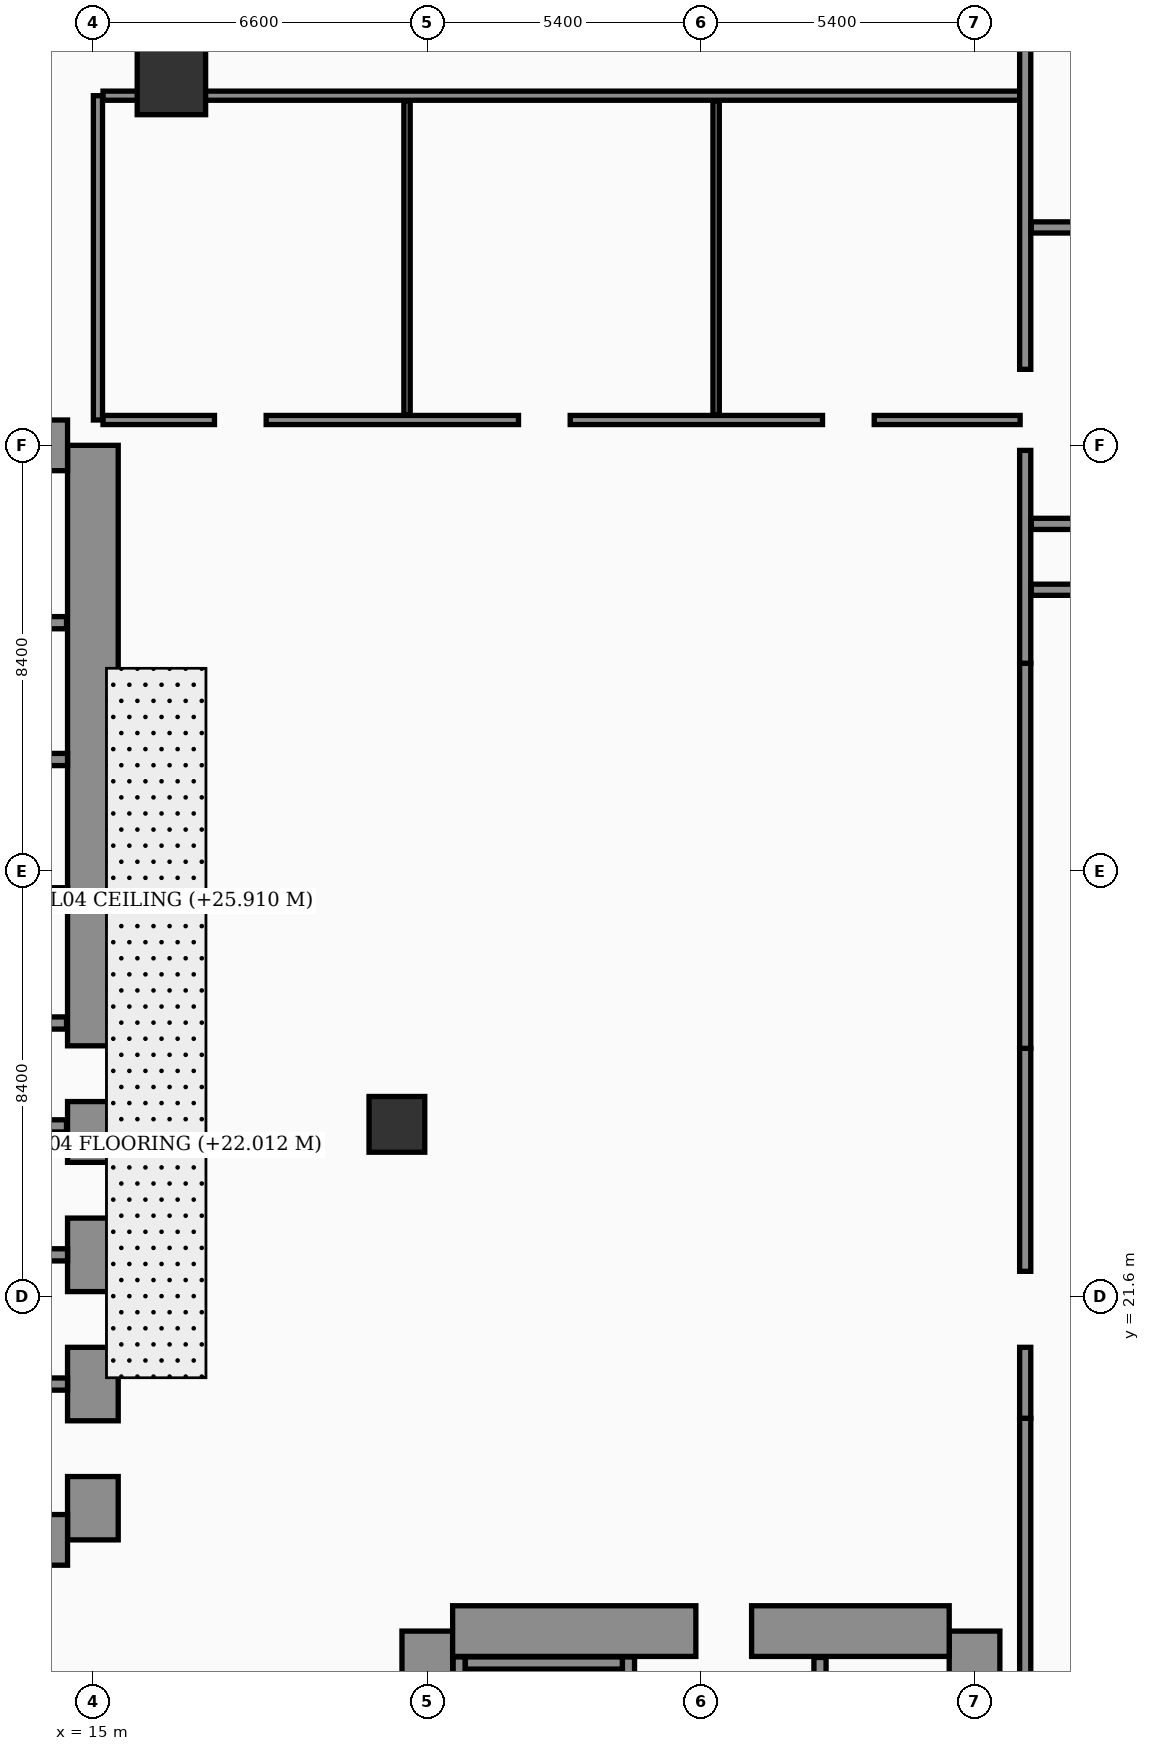
"""IFC4 building model, lengths in metres.
Left out: names, types, materials, properties, quantities, classifications, styles, units other than length and angle.
Written with IfcOpenShell. Run it as: python <this file> out.ifc"""

import sys

from ifc_helpers import new_model, si_unit, direction, frame, frame_2d, origin, origin_2d, place, context, subcontext, project, spatial, rectangle, hollow_rectangle, extrude, element, fill, save


model = new_model("IFC4")
c1 = context("Model", 3, precision=1e-05, world=origin(), true_north=direction((0.0, 1.0)))
c2 = subcontext(c1, "Body", "Model", "MODEL_VIEW")
j1 = project(units=[si_unit("LENGTHUNIT", "METRE"), si_unit("PLANEANGLEUNIT", "RADIAN")], contexts=[c1])
p1 = place(None, origin())
s1 = spatial("IfcSite", under=j1, at=p1, CompositionType="ELEMENT")
p2 = place(p1, origin())
s2 = spatial("IfcBuilding", under=s1, at=p2, CompositionType="ELEMENT")
p3 = place(p2, frame((0.0, 0.0, 22.0)))
s3 = spatial("IfcBuildingStorey", under=s2, at=p3, CompositionType="ELEMENT", Elevation=22.0)
p4 = place(p3, frame((15.0, 16.8, 0.0), z_axis=(0.0, 0.0, 1.0), x_axis=(0.0, 1.0, 0.0)))
e1 = element("IfcWall", 1, at=p4, inside=s3, PredefinedType="SHEAR", context=c2, shape_type="SweptSolid", body=[
    extrude(rectangle(XDim=21.6, YDim=1.0, at=frame_2d((10.8, 0.0))), origin(), (0.0, 0.0, 1.0), 4.76),
])
p5 = place(p4, frame((8.65, 0.0, 0.0)))
e2 = element("IfcOpeningElement", 2, at=p5, cuts=e1, PredefinedType="OPENING", context=c2, shape_type="SweptSolid", body=[
    extrude(rectangle(XDim=1.1, YDim=2.2, at=frame_2d((0.55, 1.1))), frame((0.0, 0.51, 0.0), z_axis=(0.0, -1.0, 0.0), x_axis=(1.0, 0.0, 0.0)), (0.0, 0.0, 1.0), 1.02),
])
p6 = place(p4, frame((1.25, 0.0, 0.0)))
e3 = element("IfcOpeningElement", 3, at=p6, cuts=e1, PredefinedType="OPENING", context=c2, shape_type="SweptSolid", body=[
    extrude(rectangle(XDim=1.1, YDim=2.2, at=frame_2d((0.55, 1.1))), frame((0.0, 0.51, 0.0), z_axis=(0.0, -1.0, 0.0), x_axis=(1.0, 0.0, 0.0)), (0.0, 0.0, 1.0), 1.02),
])
p7 = place(p4, frame((3.8, 0.0, 0.0)))
e4 = element("IfcOpeningElement", 4, at=p7, cuts=e1, PredefinedType="OPENING", context=c2, shape_type="SweptSolid", body=[
    extrude(rectangle(XDim=1.1, YDim=2.2, at=frame_2d((0.55, 1.1))), frame((0.0, 0.51, 0.0), z_axis=(0.0, -1.0, 0.0), x_axis=(1.0, 0.0, 0.0)), (0.0, 0.0, 1.0), 1.02),
])
p8 = place(p4, frame((6.35, 0.0, 0.0)))
e5 = element("IfcOpeningElement", 5, at=p8, cuts=e1, PredefinedType="OPENING", context=c2, shape_type="SweptSolid", body=[
    extrude(rectangle(XDim=1.1, YDim=2.2, at=frame_2d((0.55, 1.1))), frame((0.0, 0.51, 0.0), z_axis=(0.0, -1.0, 0.0), x_axis=(1.0, 0.0, 0.0)), (0.0, 0.0, 1.0), 1.02),
])
for number, where, z_axis, x_axis in (
    (6, (4.7, 38.4, 0.0), (0.0, 0.0, 1.0), (1.0, 0.0, 0.0)),
    (7, (4.7, 16.8, 0.0), (0.0, 0.0, 1.0), (1.0, 0.0, 0.0)),
):
    element("IfcWall", number, at=place(p3, frame(where, z_axis=z_axis, x_axis=x_axis)), inside=s3, PredefinedType="SHEAR", context=c2, shape_type="SweptSolid", body=[
        extrude(rectangle(XDim=9.8, YDim=1.0, at=frame_2d((4.9, 0.0))), origin(), (0.0, 0.0, 1.0), 4.76),
    ])
for number, where, z_axis, x_axis in (
    (8, (21.6, 4.6, 0.0), (0.0, 0.0, 1.0), (0.0, 1.0, 0.0)),
    (9, (32.4, 4.6, 0.0), (0.0, 0.0, 1.0), (0.0, 1.0, 0.0)),
):
    element("IfcWall", number, at=place(p3, frame(where, z_axis=z_axis, x_axis=x_axis)), inside=s3, PredefinedType="SHEAR", context=c2, shape_type="SweptSolid", body=[
        extrude(rectangle(XDim=10.4, YDim=1.0, at=frame_2d((5.2, 0.0))), origin(), (0.0, 0.0, 1.0), 4.76),
    ])
p9 = place(p3, frame((22.1, 15.0, 0.0), z_axis=(0.0, 0.0, 1.0), x_axis=(1.0, 0.0, 0.0)))
e10 = element("IfcWall", 10, at=p9, inside=s3, PredefinedType="SHEAR", context=c2, shape_type="SweptSolid", body=[
    extrude(rectangle(XDim=9.8, YDim=1.0, at=frame_2d((4.9, 0.0))), origin(), (0.0, 0.0, 1.0), 4.76),
])
p10 = place(p9, frame((4.8, 0.0, 0.0)))
e11 = element("IfcOpeningElement", 11, at=p10, cuts=e10, PredefinedType="OPENING", context=c2, shape_type="SweptSolid", body=[
    extrude(rectangle(XDim=1.1, YDim=2.2, at=frame_2d((0.55, 1.1))), frame((0.0, 0.51, 0.0), z_axis=(0.0, -1.0, 0.0), x_axis=(1.0, 0.0, 0.0)), (0.0, 0.0, 1.0), 1.02),
])
p11 = place(p3, frame((22.23, 5.1, 0.0), z_axis=(0.0, 0.0, 1.0), x_axis=(0.0, 1.0, 0.0)))
e12 = element("IfcWall", 12, at=p11, inside=s3, PredefinedType="SOLIDWALL", context=c2, shape_type="SweptSolid", body=[
    extrude(rectangle(XDim=9.39, YDim=0.24, at=frame_2d((4.695, 0.0))), origin(), (0.0, 0.0, 1.0), 4.76),
])
p12 = place(p3, frame((25.57, 5.1, 0.0), z_axis=(0.0, 0.0, 1.0), x_axis=(0.0, 1.0, 0.0)))
e13 = element("IfcWall", 13, at=p12, inside=s3, PredefinedType="SOLIDWALL", context=c2, shape_type="SweptSolid", body=[
    extrude(rectangle(XDim=9.39, YDim=0.24, at=frame_2d((4.695, 0.0))), origin(), (0.0, 0.0, 1.0), 4.76),
])
p13 = place(p12, frame((0.35, 0.0, 0.0)))
e14 = element("IfcOpeningElement", 14, at=p13, cuts=e13, PredefinedType="OPENING", context=c2, shape_type="SweptSolid", body=[
    extrude(rectangle(XDim=1.15, YDim=2.2, at=frame_2d((0.575, 1.1))), frame((0.0, 0.13, 0.0), z_axis=(0.0, -1.0, 0.0), x_axis=(1.0, 0.0, 0.0)), (0.0, 0.0, 1.0), 0.26),
])
p14 = place(p3, frame((22.35, 14.37, 0.0), z_axis=(0.0, 0.0, 1.0), x_axis=(1.0, 0.0, 0.0)))
e15 = element("IfcWall", 15, at=p14, inside=s3, PredefinedType="SOLIDWALL", context=c2, shape_type="SweptSolid", body=[
    extrude(rectangle(XDim=3.1, YDim=0.24, at=frame_2d((1.55, 0.0))), origin(), (0.0, 0.0, 1.0), 4.76),
])
for number, where, z_axis, x_axis in (
    (16, (12.18, 19.875, 0.0), (0.0, 0.0, 1.0), (1.0, 0.0, 0.0)),
    (17, (12.18, 22.425, 0.0), (0.0, 0.0, 1.0), (1.0, 0.0, 0.0)),
    (18, (12.18, 29.55, 0.0), (0.0, 0.0, 1.0), (1.0, 0.0, 0.0)),
    (19, (12.18, 32.2, 0.0), (0.0, 0.0, 1.0), (1.0, 0.0, 0.0)),
):
    element("IfcWall", number, at=place(p3, frame(where, z_axis=z_axis, x_axis=x_axis)), inside=s3, PredefinedType="SOLIDWALL", context=c2, shape_type="SweptSolid", body=[
        extrude(rectangle(XDim=2.32, YDim=0.24, at=frame_2d((1.16, 0.0))), origin(), (0.0, 0.0, 1.0), 4.76),
    ])
p15 = place(p3, frame((16.55, 45.6, 0.0), z_axis=(0.0, 0.0, 1.0), x_axis=(1.0, 0.0, 0.0)))
e20 = element("IfcColumn", 20, at=p15, inside=s3, PredefinedType="COLUMN", context=c2, shape_type="SweptSolid", body=[
    extrude(rectangle(XDim=1.35, YDim=1.35, at=origin_2d()), origin(), (0.0, 0.0, 1.0), 4.76),
])
p16 = place(p3, frame((21.0, 25.0, 0.0), z_axis=(0.0, 0.0, 1.0), x_axis=(1.0, 0.0, 0.0)))
e21 = element("IfcColumn", 21, at=p16, inside=s3, PredefinedType="COLUMN", context=c2, shape_type="SweptSolid", body=[
    extrude(hollow_rectangle(XDim=1.1, YDim=1.1, WallThickness=0.045, at=origin_2d()), origin(), (0.0, 0.0, 1.0), 4.76),
])
p17 = place(p3, frame((12.15, 24.97, 0.0), z_axis=(0.0, 0.0, 1.0), x_axis=(1.0, 0.0, 0.0)))
e22 = element("IfcWall", 22, at=p17, inside=s3, PredefinedType="SOLIDWALL", context=c2, shape_type="SweptSolid", body=[
    extrude(rectangle(XDim=2.33, YDim=0.24, at=frame_2d((1.165, 0.0))), origin(), (0.0, 0.0, 1.0), 3.94),
])
p18 = place(p3, frame((12.25, 27.0, 0.0), z_axis=(0.0, 0.0, 1.0), x_axis=(1.0, 0.0, 0.0)))
e23 = element("IfcWall", 23, at=p18, inside=s3, PredefinedType="SOLIDWALL", context=c2, shape_type="SweptSolid", body=[
    extrude(rectangle(XDim=2.23, YDim=0.24, at=frame_2d((1.115, 0.0))), origin(), (0.0, 0.0, 1.0), 4.76),
])
p19 = place(p3, frame((9.66, 34.9, 0.0), z_axis=(0.0, 0.0, 1.0), x_axis=(1.0, 0.0, 0.0)))
e24 = element("IfcWall", 24, at=p19, inside=s3, PredefinedType="SOLIDWALL", context=c2, shape_type="SweptSolid", body=[
    extrude(rectangle(XDim=4.82, YDim=0.24, at=frame_2d((2.41, 0.0))), origin(), (0.0, 0.0, 1.0), 4.76),
])
p20 = place(p3, frame((29.35, 5.12, 0.0), z_axis=(0.0, 0.0, 1.0), x_axis=(0.0, 1.0, 0.0)))
e25 = element("IfcWall", 25, at=p20, inside=s3, PredefinedType="SOLIDWALL", context=c2, shape_type="SweptSolid", body=[
    extrude(rectangle(XDim=9.36, YDim=0.24, at=frame_2d((4.68, 0.0))), origin(), (0.0, 0.0, 1.0), 4.76),
])
p21 = place(p20, frame((0.55, 0.0, 0.0)))
e26 = element("IfcOpeningElement", 26, at=p21, cuts=e25, PredefinedType="OPENING", context=c2, shape_type="SweptSolid", body=[
    extrude(rectangle(XDim=1.3, YDim=2.35, at=frame_2d((0.65, 1.175))), frame((0.0, 0.13, 0.0), z_axis=(0.0, -1.0, 0.0), x_axis=(1.0, 0.0, 0.0)), (0.0, 0.0, 1.0), 0.26),
])
p22 = place(p3, frame((15.2, 38.9, 0.0), z_axis=(0.0, 0.0, 1.0), x_axis=(1.0, 0.0, 0.0)))
e27 = element("IfcWall", 27, at=p22, inside=s3, PredefinedType="PARTITIONING", context=c2, shape_type="SweptSolid", body=[
    extrude(rectangle(XDim=18.1, YDim=0.18, at=frame_2d((9.05, 0.0))), origin(), (0.0, 0.0, 1.0), 3.94),
])
p23 = place(p22, frame((2.2, 0.0, 0.0)))
e28 = element("IfcOpeningElement", 28, at=p23, cuts=e27, PredefinedType="OPENING", context=c2, shape_type="SweptSolid", body=[
    extrude(rectangle(XDim=1.02, YDim=2.2, at=frame_2d((0.51, 1.1))), frame((0.0, 0.1, 0.0), z_axis=(0.0, -1.0, 0.0), x_axis=(1.0, 0.0, 0.0)), (0.0, 0.0, 1.0), 0.2),
])
p24 = place(p22, frame((8.2, 0.0, 0.0)))
e29 = element("IfcOpeningElement", 29, at=p24, cuts=e27, PredefinedType="OPENING", context=c2, shape_type="SweptSolid", body=[
    extrude(rectangle(XDim=1.02, YDim=2.2, at=frame_2d((0.51, 1.1))), frame((0.0, 0.1, 0.0), z_axis=(0.0, -1.0, 0.0), x_axis=(1.0, 0.0, 0.0)), (0.0, 0.0, 1.0), 0.2),
])
p25 = place(p22, frame((14.2, 0.0, 0.0)))
e30 = element("IfcOpeningElement", 30, at=p25, cuts=e27, PredefinedType="OPENING", context=c2, shape_type="SweptSolid", body=[
    extrude(rectangle(XDim=1.02, YDim=2.2, at=frame_2d((0.51, 1.1))), frame((0.0, 0.1, 0.0), z_axis=(0.0, -1.0, 0.0), x_axis=(1.0, 0.0, 0.0)), (0.0, 0.0, 1.0), 0.2),
])
p26 = place(p3, frame((15.2, 45.3, 0.0), z_axis=(0.0, 0.0, 1.0), x_axis=(1.0, 0.0, 0.0)))
e31 = element("IfcWall", 31, at=p26, inside=s3, PredefinedType="PARTITIONING", context=c2, shape_type="SweptSolid", body=[
    extrude(rectangle(XDim=18.1, YDim=0.18, at=frame_2d((9.05, 0.0))), origin(), (0.0, 0.0, 1.0), 3.94),
])
p27 = place(p3, frame((15.1, 38.9, 0.0), z_axis=(0.0, 0.0, 1.0), x_axis=(0.0, 1.0, 0.0)))
e32 = element("IfcWall", 32, at=p27, inside=s3, PredefinedType="PARTITIONING", context=c2, shape_type="SweptSolid", body=[
    extrude(rectangle(XDim=6.4, YDim=0.18, at=frame_2d((3.2, 0.0))), origin(), (0.0, 0.0, 1.0), 3.94),
])
p28 = place(p3, frame((21.2, 39.0, 0.0), z_axis=(0.0, 0.0, 1.0), x_axis=(0.0, 1.0, 0.0)))
e33 = element("IfcWall", 33, at=p28, inside=s3, PredefinedType="PARTITIONING", context=c2, shape_type="SweptSolid", body=[
    extrude(rectangle(XDim=6.2, YDim=0.125, at=frame_2d((3.1, 0.0))), origin(), (0.0, 0.0, 1.0), 3.94),
])
p29 = place(p3, frame((27.3, 39.0, 0.0), z_axis=(0.0, 0.0, 1.0), x_axis=(0.0, 1.0, 0.0)))
e34 = element("IfcWall", 34, at=p29, inside=s3, PredefinedType="PARTITIONING", context=c2, shape_type="SweptSolid", body=[
    extrude(rectangle(XDim=6.2, YDim=0.125, at=frame_2d((3.1, 0.0))), origin(), (0.0, 0.0, 1.0), 4.76),
])
p30 = place(p3, frame((33.4, 13.8, 0.0), z_axis=(0.0, 0.0, 1.0), x_axis=(0.0, 1.0, 0.0)))
e35 = element("IfcWall", 35, at=p30, inside=s3, PredefinedType="SOLIDWALL", context=c2, shape_type="SweptSolid", body=[
    extrude(rectangle(XDim=5.4, YDim=0.22, at=frame_2d((2.7, 0.0))), origin(), (0.0, 0.0, 1.0), 1.89),
])
p31 = place(p3, frame((33.4, 19.2, 0.0), z_axis=(0.0, 0.0, 1.0), x_axis=(0.0, 1.0, 0.0)))
e36 = element("IfcWall", 36, at=p31, inside=s3, PredefinedType="SOLIDWALL", context=c2, shape_type="SweptSolid", body=[
    extrude(rectangle(XDim=7.3, YDim=0.22, at=frame_2d((3.65, 0.0))), origin(), (0.0, 0.0, 1.0), 4.76),
])
p32 = place(p31, frame((1.4, 0.0, 0.0)))
e37 = element("IfcOpeningElement", 37, at=p32, cuts=e36, PredefinedType="OPENING", context=c2, shape_type="SweptSolid", body=[
    extrude(rectangle(XDim=1.5, YDim=2.22, at=frame_2d((0.75, 1.11))), frame((0.0, 0.12, 0.0), z_axis=(0.0, -1.0, 0.0), x_axis=(1.0, 0.0, 0.0)), (0.0, 0.0, 1.0), 0.24),
])
p33 = place(p3, frame((33.4, 26.5, 0.0), z_axis=(0.0, 0.0, 1.0), x_axis=(0.0, 1.0, 0.0)))
e38 = element("IfcWall", 38, at=p33, inside=s3, PredefinedType="SOLIDWALL", context=c2, shape_type="SweptSolid", body=[
    extrude(rectangle(XDim=7.6, YDim=0.22, at=frame_2d((3.8, 0.0))), origin(), (0.0, 0.0, 1.0), 1.89),
])
p34 = place(p3, frame((33.4, 34.1, 0.0), z_axis=(0.0, 0.0, 1.0), x_axis=(0.0, 1.0, 0.0)))
e39 = element("IfcWall", 39, at=p34, inside=s3, PredefinedType="SOLIDWALL", context=c2, shape_type="SweptSolid", body=[
    extrude(rectangle(XDim=21.34, YDim=0.22, at=frame_2d((10.67, 0.0))), origin(), (0.0, 0.0, 1.0), 3.94),
])
p35 = place(p34, frame((4.2, 0.0, 0.0)))
e40 = element("IfcOpeningElement", 40, at=p35, cuts=e39, PredefinedType="OPENING", context=c2, shape_type="SweptSolid", body=[
    extrude(rectangle(XDim=1.6, YDim=2.35, at=frame_2d((0.8, 1.175))), frame((0.0, 0.12, 0.0), z_axis=(0.0, -1.0, 0.0), x_axis=(1.0, 0.0, 0.0)), (0.0, 0.0, 1.0), 0.24),
])
p36 = place(p3, frame((33.52, 35.55, 0.0), z_axis=(0.0, 0.0, 1.0), x_axis=(1.0, 0.0, 0.0)))
e41 = element("IfcWall", 41, at=p36, inside=s3, PredefinedType="SOLIDWALL", context=c2, shape_type="SweptSolid", body=[
    extrude(rectangle(XDim=42.36, YDim=0.22, at=frame_2d((21.18, 0.0))), origin(), (0.0, 0.0, 1.0), 1.89),
])
for number, where, z_axis, x_axis in (
    (42, (33.52, 36.85, 0.0), (0.0, 0.0, 1.0), (1.0, 0.0, 0.0)),
    (43, (33.52, 42.7, 0.0), (0.0, 0.0, 1.0), (1.0, 0.0, 0.0)),
):
    element("IfcWall", number, at=place(p3, frame(where, z_axis=z_axis, x_axis=x_axis)), inside=s3, PredefinedType="SOLIDWALL", context=c2, shape_type="SweptSolid", body=[
        extrude(rectangle(XDim=42.36, YDim=0.22, at=frame_2d((21.18, 0.0))), origin(), (0.0, 0.0, 1.0), 3.94),
    ])
p37 = place(p3, frame((0.0, 0.0, -0.45)))
p38 = place(p37, frame((24.5, 27.5, 0.0)))
p39 = place(p38, frame((0.0, 0.0, 0.4)))
e44 = element("IfcWindow", 44, at=p39, inside=s3, PartitioningType="SINGLE_PANEL", PredefinedType="SKYLIGHT", context=c2, shape_type="SweptSolid", body=[
    extrude(rectangle(XDim=2.4, YDim=2.4, at=origin_2d()), origin(), (0.0, 0.0, 1.0), 0.05),
])
p40 = place(p37, frame((29.5, 27.5, 0.0)))
p41 = place(p40, frame((0.0, 0.0, 0.4)))
e45 = element("IfcWindow", 45, at=p41, inside=s3, PartitioningType="SINGLE_PANEL", PredefinedType="SKYLIGHT", context=c2, shape_type="SweptSolid", body=[
    extrude(rectangle(XDim=2.4, YDim=2.4, at=origin_2d()), origin(), (0.0, 0.0, 1.0), 0.05),
])
p42 = place(p37, frame((24.5, 32.5, 0.0)))
p43 = place(p42, frame((0.0, 0.0, 0.4)))
e46 = element("IfcWindow", 46, at=p43, inside=s3, PartitioningType="SINGLE_PANEL", PredefinedType="SKYLIGHT", context=c2, shape_type="SweptSolid", body=[
    extrude(rectangle(XDim=2.4, YDim=2.4, at=origin_2d()), origin(), (0.0, 0.0, 1.0), 0.05),
])
p44 = place(p37, frame((29.5, 32.5, 0.0)))
p45 = place(p44, frame((0.0, 0.0, 0.4)))
e47 = element("IfcWindow", 47, at=p45, inside=s3, PartitioningType="SINGLE_PANEL", PredefinedType="SKYLIGHT", context=c2, shape_type="SweptSolid", body=[
    extrude(rectangle(XDim=2.4, YDim=2.4, at=origin_2d()), origin(), (0.0, 0.0, 1.0), 0.05),
])
p46 = place(p23, origin())
e48 = element("IfcDoor", 48, at=p46, inside=s3, OperationType="SINGLE_SWING_LEFT", PredefinedType="DOOR", context=c2, shape_type="SweptSolid", body=[
    extrude(rectangle(XDim=1.02, YDim=2.2, at=frame_2d((0.51, 1.1))), frame((0.0, 0.025, 0.0), z_axis=(0.0, -1.0, 0.0), x_axis=(1.0, 0.0, 0.0)), (0.0, 0.0, 1.0), 0.05),
])
fill(e28, e48)
p47 = place(p24, origin())
e49 = element("IfcDoor", 49, at=p47, inside=s3, OperationType="SINGLE_SWING_RIGHT", PredefinedType="DOOR", context=c2, shape_type="SweptSolid", body=[
    extrude(rectangle(XDim=1.02, YDim=2.2, at=frame_2d((0.51, 1.1))), frame((0.0, 0.025, 0.0), z_axis=(0.0, -1.0, 0.0), x_axis=(1.0, 0.0, 0.0)), (0.0, 0.0, 1.0), 0.05),
])
fill(e29, e49)
p48 = place(p25, origin())
e50 = element("IfcDoor", 50, at=p48, inside=s3, OperationType="SINGLE_SWING_LEFT", PredefinedType="DOOR", context=c2, shape_type="SweptSolid", body=[
    extrude(rectangle(XDim=1.02, YDim=2.2, at=frame_2d((0.51, 1.1))), frame((0.0, 0.025, 0.0), z_axis=(0.0, -1.0, 0.0), x_axis=(1.0, 0.0, 0.0)), (0.0, 0.0, 1.0), 0.05),
])
fill(e30, e50)
p49 = place(p32, origin())
e51 = element("IfcDoor", 51, at=p49, inside=s3, OperationType="SINGLE_SWING_RIGHT", PredefinedType="DOOR", context=c2, shape_type="SweptSolid", body=[
    extrude(rectangle(XDim=1.5, YDim=2.22, at=frame_2d((0.75, 1.11))), frame((0.0, 0.025, 0.0), z_axis=(0.0, -1.0, 0.0), x_axis=(1.0, 0.0, 0.0)), (0.0, 0.0, 1.0), 0.05),
])
fill(e37, e51)
p50 = place(p35, origin())
e52 = element("IfcDoor", 52, at=p50, inside=s3, OperationType="SINGLE_SWING_LEFT", PredefinedType="DOOR", context=c2, shape_type="SweptSolid", body=[
    extrude(rectangle(XDim=1.6, YDim=2.35, at=frame_2d((0.8, 1.175))), frame((0.0, 0.025, 0.0), z_axis=(0.0, -1.0, 0.0), x_axis=(1.0, 0.0, 0.0)), (0.0, 0.0, 1.0), 0.05),
])
fill(e40, e52)
p51 = place(p5, origin())
e53 = element("IfcDoor", 53, at=p51, inside=s3, OperationType="SINGLE_SWING_LEFT", PredefinedType="DOOR", context=c2, shape_type="SweptSolid", body=[
    extrude(rectangle(XDim=1.1, YDim=2.2, at=frame_2d((0.55, 1.1))), frame((0.0, 0.025, 0.0), z_axis=(0.0, -1.0, 0.0), x_axis=(1.0, 0.0, 0.0)), (0.0, 0.0, 1.0), 0.05),
])
fill(e2, e53)
p52 = place(p6, origin())
e54 = element("IfcDoor", 54, at=p52, inside=s3, OperationType="DOUBLE_DOOR_SLIDING", PredefinedType="DOOR", context=c2, shape_type="SweptSolid", body=[
    extrude(rectangle(XDim=1.1, YDim=2.2, at=frame_2d((0.55, 1.1))), frame((0.0, 0.025, 0.0), z_axis=(0.0, -1.0, 0.0), x_axis=(1.0, 0.0, 0.0)), (0.0, 0.0, 1.0), 0.05),
])
fill(e3, e54)
p53 = place(p7, origin())
e55 = element("IfcDoor", 55, at=p53, inside=s3, OperationType="DOUBLE_DOOR_SLIDING", PredefinedType="DOOR", context=c2, shape_type="SweptSolid", body=[
    extrude(rectangle(XDim=1.1, YDim=2.2, at=frame_2d((0.55, 1.1))), frame((0.0, 0.025, 0.0), z_axis=(0.0, -1.0, 0.0), x_axis=(1.0, 0.0, 0.0)), (0.0, 0.0, 1.0), 0.05),
])
fill(e4, e55)
p54 = place(p8, origin())
e56 = element("IfcDoor", 56, at=p54, inside=s3, OperationType="DOUBLE_DOOR_SLIDING", PredefinedType="DOOR", context=c2, shape_type="SweptSolid", body=[
    extrude(rectangle(XDim=1.1, YDim=2.2, at=frame_2d((0.55, 1.1))), frame((0.0, 0.025, 0.0), z_axis=(0.0, -1.0, 0.0), x_axis=(1.0, 0.0, 0.0)), (0.0, 0.0, 1.0), 0.05),
])
fill(e5, e56)
p55 = place(p10, origin())
e57 = element("IfcDoor", 57, at=p55, inside=s3, OperationType="SINGLE_SWING_RIGHT", PredefinedType="DOOR", context=c2, shape_type="SweptSolid", body=[
    extrude(rectangle(XDim=1.1, YDim=2.2, at=frame_2d((0.55, 1.1))), frame((0.0, 0.025, 0.0), z_axis=(0.0, -1.0, 0.0), x_axis=(1.0, 0.0, 0.0)), (0.0, 0.0, 1.0), 0.05),
])
fill(e11, e57)
save(model, sys.argv[1])
